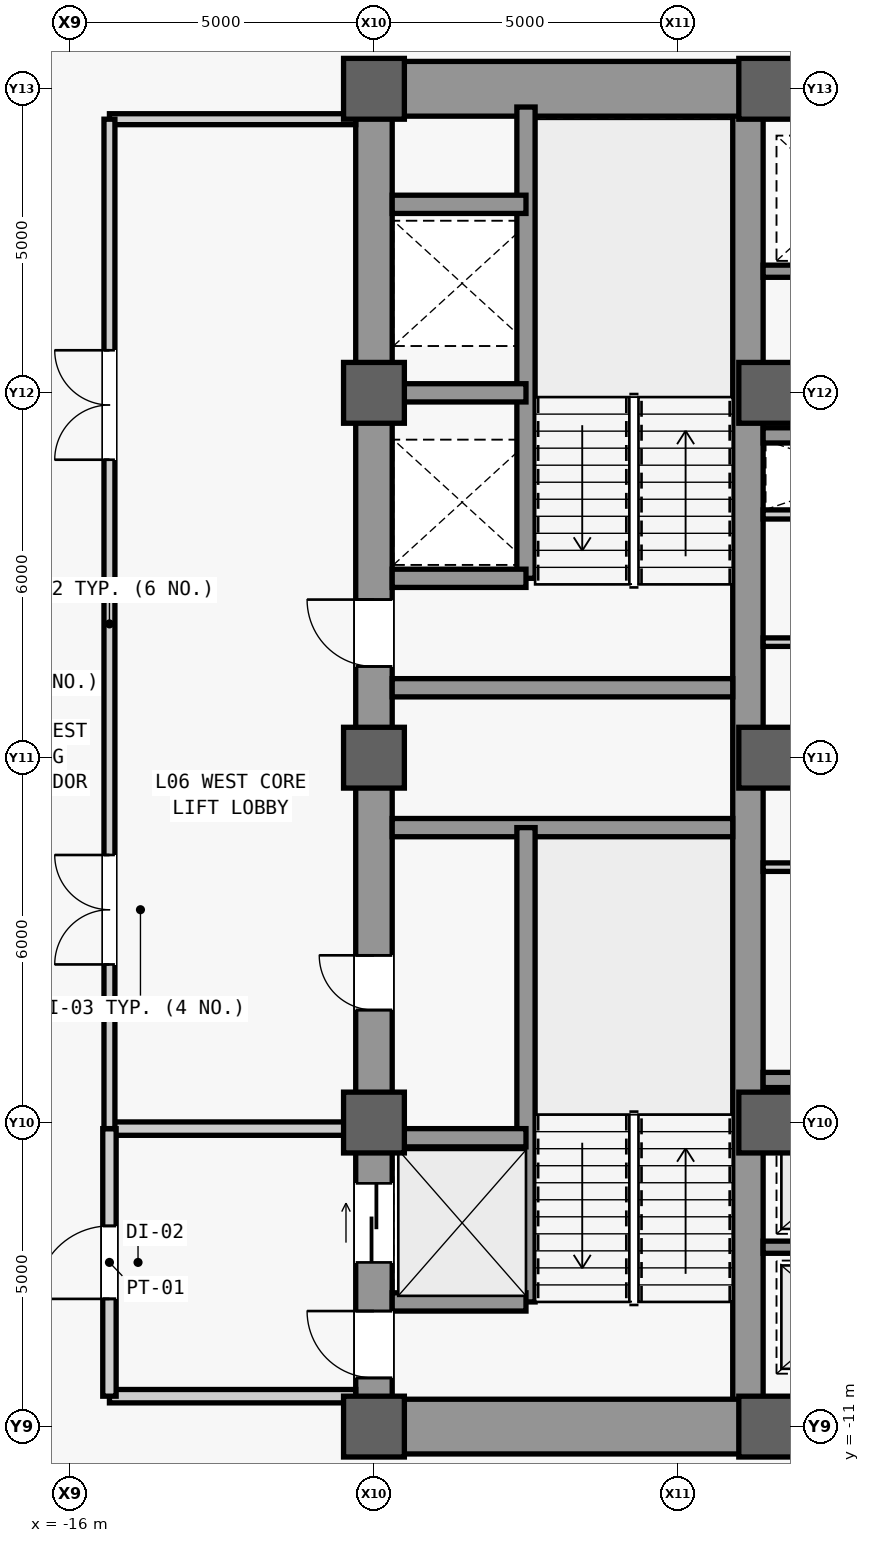
"""IFC4 building model, lengths in metres.
Left out: names, types, materials, properties, quantities, classifications, styles, units other than length and angle.
Written with IfcOpenShell. Run it as: python <this file> out.ifc"""

import sys

from ifc_helpers import new_model, si_unit, direction, frame, frame_2d, origin, origin_2d, place, context, subcontext, project, spatial, rectangle, extrude, source, transform, mapped, element, fill, save


model = new_model("IFC4")
c1 = context("Model", 3, precision=1e-05, world=origin(), true_north=direction((0.0, 1.0)))
c2 = subcontext(c1, "Body", "Model", "MODEL_VIEW")
j1 = project(units=[si_unit("LENGTHUNIT", "METRE"), si_unit("PLANEANGLEUNIT", "RADIAN")], contexts=[c1])
p1 = place(None, origin())
s1 = spatial("IfcSite", under=j1, at=p1, CompositionType="ELEMENT")
p2 = place(p1, origin())
s2 = spatial("IfcBuilding", under=s1, at=p2, CompositionType="ELEMENT")
p3 = place(p2, frame((0.0, 0.0, 32.6)))
s3 = spatial("IfcBuildingStorey", under=s2, at=p3, CompositionType="ELEMENT", Elevation=32.6)
m1 = source(origin(), c2, "Body", "SweptSolid", [
    extrude(rectangle(XDim=22.0, YDim=0.6, at=frame_2d((11.0, 0.0))), origin(), (0.0, 0.0, 1.0), 3.94),
])
p4 = place(p3, frame((-11.0, -11.0, 0.0), z_axis=(0.0, 0.0, 1.0), x_axis=(0.0, 1.0, 0.0)))
e1 = element("IfcWall", 1, at=p4, inside=s3, PredefinedType="SHEAR", context=c2, shape_type="MappedRepresentation", body=[
    mapped(m1, transform((0.0, 0.0, 0.0), scale=1.0)),
])
m2 = source(origin(), c2, "Body", "SweptSolid", [
    extrude(rectangle(XDim=1.1, YDim=2.2, at=frame_2d((0.55, 1.1))), frame((0.0, 0.31, 0.0), z_axis=(0.0, -1.0, 0.0), x_axis=(1.0, 0.0, 0.0)), (0.0, 0.0, 1.0), 0.62),
])
p5 = place(p4, frame((0.8, 0.0, 0.0)))
e2 = element("IfcOpeningElement", 2, at=p5, cuts=e1, PredefinedType="OPENING", context=c2, shape_type="MappedRepresentation", body=[
    mapped(m2, transform((0.0, 0.0, 0.0), scale=1.0)),
])
p6 = place(p4, frame((12.5, 0.0, 0.0)))
e3 = element("IfcOpeningElement", 3, at=p6, cuts=e1, PredefinedType="OPENING", context=c2, shape_type="MappedRepresentation", body=[
    mapped(m2, transform((0.0, 0.0, 0.0), scale=1.0)),
])
m3 = source(origin(), c2, "Body", "SweptSolid", [
    extrude(rectangle(XDim=0.9, YDim=2.15, at=frame_2d((0.45, 1.075))), frame((0.0, 0.31, 0.0), z_axis=(0.0, -1.0, 0.0), x_axis=(1.0, 0.0, 0.0)), (0.0, 0.0, 1.0), 0.62),
])
p7 = place(p4, frame((6.85, 0.0, 0.0)))
e4 = element("IfcOpeningElement", 4, at=p7, cuts=e1, PredefinedType="OPENING", context=c2, shape_type="MappedRepresentation", body=[
    mapped(m3, transform((0.0, 0.0, 0.0), scale=1.0)),
])
m4 = source(origin(), c2, "Body", "SweptSolid", [
    extrude(rectangle(XDim=1.3, YDim=2.3, at=frame_2d((0.65, 1.15))), frame((0.0, 0.31, 0.0), z_axis=(0.0, -1.0, 0.0), x_axis=(1.0, 0.0, 0.0)), (0.0, 0.0, 1.0), 0.62),
])
p8 = place(p4, frame((2.7, 0.0, 0.0)))
e5 = element("IfcOpeningElement", 5, at=p8, cuts=e1, PredefinedType="OPENING", context=c2, shape_type="MappedRepresentation", body=[
    mapped(m4, transform((0.0, 0.0, 0.0), scale=1.0)),
])
m5 = source(origin(), c2, "Body", "SweptSolid", [
    extrude(rectangle(XDim=21.4, YDim=0.5, at=frame_2d((10.7, 0.0))), origin(), (0.0, 0.0, 1.0), 3.94),
])
p9 = place(p3, frame((-4.85, -10.7, 0.0), z_axis=(0.0, 0.0, 1.0), x_axis=(0.0, 1.0, 0.0)))
e6 = element("IfcWall", 6, at=p9, inside=s3, PredefinedType="SHEAR", context=c2, shape_type="MappedRepresentation", body=[
    mapped(m5, transform((0.0, 0.0, 0.0), scale=1.0)),
])
m6 = source(origin(), c2, "Body", "SweptSolid", [
    extrude(rectangle(XDim=5.85, YDim=0.9, at=frame_2d((2.925, 0.0))), origin(), (0.0, 0.0, 1.0), 3.94),
])
for number, where, z_axis, x_axis in (
    (7, (-10.7, -11.0, 0.0), (0.0, 0.0, 1.0), (1.0, 0.0, 0.0)),
    (8, (-10.7, 11.0, 0.0), (0.0, 0.0, 1.0), (1.0, 0.0, 0.0)),
):
    element("IfcWall", number, at=place(p3, frame(where, z_axis=z_axis, x_axis=x_axis)), inside=s3, PredefinedType="SHEAR", context=c2, shape_type="MappedRepresentation", body=[
        mapped(m6, transform((0.0, 0.0, 0.0), scale=1.0)),
    ])
m7 = source(origin(), c2, "Body", "SweptSolid", [
    extrude(rectangle(XDim=5.6, YDim=0.3, at=frame_2d((2.8, 0.0))), origin(), (0.0, 0.0, 1.0), 3.94),
])
for number, where, z_axis, x_axis in (
    (9, (-10.7, -1.15, 0.0), (0.0, 0.0, 1.0), (1.0, 0.0, 0.0)),
    (10, (-10.7, 1.15, 0.0), (0.0, 0.0, 1.0), (1.0, 0.0, 0.0)),
):
    element("IfcWall", number, at=place(p3, frame(where, z_axis=z_axis, x_axis=x_axis)), inside=s3, PredefinedType="SHEAR", context=c2, shape_type="MappedRepresentation", body=[
        mapped(m7, transform((0.0, 0.0, 0.0), scale=1.0)),
    ])
m8 = source(origin(), c2, "Body", "SweptSolid", [
    extrude(rectangle(XDim=9.2, YDim=0.5, at=frame_2d((4.6, 0.0))), origin(), (0.0, 0.0, 1.0), 3.94),
])
p10 = place(p3, frame((-4.6, -11.0, 0.0), z_axis=(0.0, 0.0, 1.0), x_axis=(1.0, 0.0, 0.0)))
e11 = element("IfcWall", 11, at=p10, inside=s3, PredefinedType="SHEAR", context=c2, shape_type="MappedRepresentation", body=[
    mapped(m8, transform((0.0, 0.0, 0.0), scale=1.0)),
])
m9 = source(origin(), c2, "Body", "SweptSolid", [
    extrude(rectangle(XDim=1.8, YDim=2.25, at=frame_2d((0.9, 1.125))), frame((0.0, 0.26, 0.0), z_axis=(0.0, -1.0, 0.0), x_axis=(1.0, 0.0, 0.0)), (0.0, 0.0, 1.0), 0.52),
])
p11 = place(p10, frame((3.7, 0.0, 0.0)))
e12 = element("IfcOpeningElement", 12, at=p11, cuts=e11, PredefinedType="OPENING", context=c2, shape_type="MappedRepresentation", body=[
    mapped(m9, transform((0.0, 0.0, 0.0), scale=1.0)),
])
p12 = place(p3, frame((-4.6, 11.0, 0.0), z_axis=(0.0, 0.0, 1.0), x_axis=(1.0, 0.0, 0.0)))
e13 = element("IfcWall", 13, at=p12, inside=s3, PredefinedType="SHEAR", context=c2, shape_type="MappedRepresentation", body=[
    mapped(m8, transform((0.0, 0.0, 0.0), scale=1.0)),
])
p13 = place(p12, frame((3.7, 0.0, 0.0)))
e14 = element("IfcOpeningElement", 14, at=p13, cuts=e13, PredefinedType="OPENING", context=c2, shape_type="MappedRepresentation", body=[
    mapped(m9, transform((0.0, 0.0, 0.0), scale=1.0)),
])
m10 = source(origin(), c2, "Body", "SweptSolid", [
    extrude(rectangle(XDim=1.0, YDim=1.0, at=origin_2d()), origin(), (0.0, 0.0, 1.0), 4.2),
])
for number, where, z_axis, x_axis in (
    (15, (-11.0, -11.0, 0.0), (0.0, 0.0, 1.0), (1.0, 0.0, 0.0)),
    (16, (-11.0, -6.0, 0.0), (0.0, 0.0, 1.0), (1.0, 0.0, 0.0)),
    (17, (-11.0, 0.0, 0.0), (0.0, 0.0, 1.0), (1.0, 0.0, 0.0)),
    (18, (-11.0, 6.0, 0.0), (0.0, 0.0, 1.0), (1.0, 0.0, 0.0)),
    (19, (-11.0, 11.0, 0.0), (0.0, 0.0, 1.0), (1.0, 0.0, 0.0)),
    (20, (-4.5, -11.0, 0.0), (0.0, 0.0, 1.0), (1.0, 0.0, 0.0)),
    (21, (-4.5, -6.0, 0.0), (0.0, 0.0, 1.0), (1.0, 0.0, 0.0)),
    (22, (-4.5, 0.0, 0.0), (0.0, 0.0, 1.0), (1.0, 0.0, 0.0)),
    (23, (-4.5, 6.0, 0.0), (0.0, 0.0, 1.0), (1.0, 0.0, 0.0)),
    (24, (-4.5, 11.0, 0.0), (0.0, 0.0, 1.0), (1.0, 0.0, 0.0)),
):
    element("IfcColumn", number, at=place(p3, frame(where, z_axis=z_axis, x_axis=x_axis)), inside=s3, PredefinedType="COLUMN", context=c2, shape_type="MappedRepresentation", body=[
        mapped(m10, transform((0.0, 0.0, 0.0), scale=1.0)),
    ])
m11 = source(origin(), c2, "Body", "SweptSolid", [
    extrude(rectangle(XDim=7.8, YDim=0.3, at=frame_2d((3.9, 0.0))), origin(), (0.0, 0.0, 1.0), 3.94),
])
p14 = place(p3, frame((-8.5, -8.95, 0.0), z_axis=(0.0, 0.0, 1.0), x_axis=(0.0, 1.0, 0.0)))
e25 = element("IfcWall", 25, at=p14, inside=s3, PredefinedType="SHEAR", context=c2, shape_type="MappedRepresentation", body=[
    mapped(m11, transform((0.0, 0.0, 0.0), scale=1.0)),
])
m12 = source(origin(), c2, "Body", "SweptSolid", [
    extrude(rectangle(XDim=2.2, YDim=0.3, at=frame_2d((1.1, 0.0))), origin(), (0.0, 0.0, 1.0), 3.94),
])
for number, where, z_axis, x_axis in (
    (26, (-10.7, -8.95, 0.0), (0.0, 0.0, 1.0), (1.0, 0.0, 0.0)),
    (27, (-10.7, -6.25, 0.0), (0.0, 0.0, 1.0), (1.0, 0.0, 0.0)),
):
    element("IfcWall", number, at=place(p3, frame(where, z_axis=z_axis, x_axis=x_axis)), inside=s3, PredefinedType="SHEAR", context=c2, shape_type="MappedRepresentation", body=[
        mapped(m12, transform((0.0, 0.0, 0.0), scale=1.0)),
    ])
m13 = source(origin(), c2, "Body", "SweptSolid", [
    extrude(rectangle(XDim=7.75, YDim=0.3, at=frame_2d((3.875, 0.0))), origin(), (0.0, 0.0, 1.0), 3.94),
])
p15 = place(p3, frame((-8.5, 2.95, 0.0), z_axis=(0.0, 0.0, 1.0), x_axis=(0.0, 1.0, 0.0)))
e28 = element("IfcWall", 28, at=p15, inside=s3, PredefinedType="SHEAR", context=c2, shape_type="MappedRepresentation", body=[
    mapped(m13, transform((0.0, 0.0, 0.0), scale=1.0)),
])
for number, where, z_axis, x_axis in (
    (29, (-10.7, 2.95, 0.0), (0.0, 0.0, 1.0), (1.0, 0.0, 0.0)),
    (30, (-10.7, 6.0, 0.0), (0.0, 0.0, 1.0), (1.0, 0.0, 0.0)),
    (31, (-10.7, 9.1, 0.0), (0.0, 0.0, 1.0), (1.0, 0.0, 0.0)),
):
    element("IfcWall", number, at=place(p3, frame(where, z_axis=z_axis, x_axis=x_axis)), inside=s3, PredefinedType="SHEAR", context=c2, shape_type="MappedRepresentation", body=[
        mapped(m12, transform((0.0, 0.0, 0.0), scale=1.0)),
    ])
m14 = source(origin(), c2, "Body", "SweptSolid", [
    extrude(rectangle(XDim=4.05, YDim=0.22, at=frame_2d((2.025, 0.0))), origin(), (0.0, 0.0, 1.0), 3.94),
])
p16 = place(p3, frame((-15.35, -10.5, 0.0), z_axis=(0.0, 0.0, 1.0), x_axis=(1.0, 0.0, 0.0)))
e32 = element("IfcWall", 32, at=p16, inside=s3, PredefinedType="PARTITIONING", context=c2, shape_type="MappedRepresentation", body=[
    mapped(m14, transform((0.0, 0.0, 0.0), scale=1.0)),
])
m15 = source(origin(), c2, "Body", "SweptSolid", [
    extrude(rectangle(XDim=4.05, YDim=0.22, at=frame_2d((2.025, 0.0))), origin(), (0.0, 0.0, 1.0), 3.085),
])
p17 = place(p3, frame((-15.35, -6.1, 0.0), z_axis=(0.0, 0.0, 1.0), x_axis=(1.0, 0.0, 0.0)))
e33 = element("IfcWall", 33, at=p17, inside=s3, PredefinedType="PARTITIONING", context=c2, shape_type="MappedRepresentation", body=[
    mapped(m15, transform((0.0, 0.0, 0.0), scale=1.0)),
])
m16 = source(origin(), c2, "Body", "SweptSolid", [
    extrude(rectangle(XDim=4.4, YDim=0.22, at=frame_2d((2.2, 0.0))), origin(), (0.0, 0.0, 1.0), 3.94),
])
p18 = place(p3, frame((-15.35, -10.5, 0.0), z_axis=(0.0, 0.0, 1.0), x_axis=(0.0, 1.0, 0.0)))
e34 = element("IfcWall", 34, at=p18, inside=s3, PredefinedType="PARTITIONING", context=c2, shape_type="MappedRepresentation", body=[
    mapped(m16, transform((0.0, 0.0, 0.0), scale=1.0)),
])
m17 = source(origin(), c2, "Body", "SweptSolid", [
    extrude(rectangle(XDim=1.2, YDim=2.2, at=frame_2d((0.6, 1.1))), frame((0.0, 0.12, 0.0), z_axis=(0.0, -1.0, 0.0), x_axis=(1.0, 0.0, 0.0)), (0.0, 0.0, 1.0), 0.24),
])
p19 = place(p18, frame((1.6, 0.0, 0.0)))
e35 = element("IfcOpeningElement", 35, at=p19, cuts=e34, PredefinedType="OPENING", context=c2, shape_type="MappedRepresentation", body=[
    mapped(m17, transform((0.0, 0.0, 0.0), scale=1.0)),
])
m18 = source(origin(), c2, "Body", "SweptSolid", [
    extrude(rectangle(XDim=4.05, YDim=0.18, at=frame_2d((2.025, 0.0))), origin(), (0.0, 0.0, 1.0), 3.94),
])
p20 = place(p3, frame((-15.35, 10.5, 0.0), z_axis=(0.0, 0.0, 1.0), x_axis=(1.0, 0.0, 0.0)))
e36 = element("IfcWall", 36, at=p20, inside=s3, PredefinedType="PARTITIONING", context=c2, shape_type="MappedRepresentation", body=[
    mapped(m18, transform((0.0, 0.0, 0.0), scale=1.0)),
])
m19 = source(origin(), c2, "Body", "SweptSolid", [
    extrude(rectangle(XDim=16.6, YDim=0.18, at=frame_2d((8.3, 0.0))), origin(), (0.0, 0.0, 1.0), 3.94),
])
p21 = place(p3, frame((-15.35, -6.1, 0.0), z_axis=(0.0, 0.0, 1.0), x_axis=(0.0, 1.0, 0.0)))
e37 = element("IfcWall", 37, at=p21, inside=s3, PredefinedType="PARTITIONING", context=c2, shape_type="MappedRepresentation", body=[
    mapped(m19, transform((0.0, 0.0, 0.0), scale=1.0)),
])
m20 = source(origin(), c2, "Body", "SweptSolid", [
    extrude(rectangle(XDim=1.8, YDim=2.25, at=frame_2d((0.9, 1.125))), frame((0.0, 0.1, 0.0), z_axis=(0.0, -1.0, 0.0), x_axis=(1.0, 0.0, 0.0)), (0.0, 0.0, 1.0), 0.2),
])
p22 = place(p21, frame((2.7, 0.0, 0.0)))
e38 = element("IfcOpeningElement", 38, at=p22, cuts=e37, PredefinedType="OPENING", context=c2, shape_type="MappedRepresentation", body=[
    mapped(m20, transform((0.0, 0.0, 0.0), scale=1.0)),
])
p23 = place(p21, frame((11.0, 0.0, 0.0)))
e39 = element("IfcOpeningElement", 39, at=p23, cuts=e37, PredefinedType="OPENING", context=c2, shape_type="MappedRepresentation", body=[
    mapped(m20, transform((0.0, 0.0, 0.0), scale=1.0)),
])
m21 = source(origin(), c2, "Body", "SweptSolid", [
    extrude(rectangle(XDim=3.45, YDim=0.15, at=frame_2d((1.725, 0.0))), origin(), (0.0, 0.0, 1.0), 3.94),
])
p24 = place(p3, frame((-4.6, 4.0, 0.0), z_axis=(0.0, 0.0, 1.0), x_axis=(1.0, 0.0, 0.0)))
e40 = element("IfcWall", 40, at=p24, inside=s3, PredefinedType="PARTITIONING", context=c2, shape_type="MappedRepresentation", body=[
    mapped(m21, transform((0.0, 0.0, 0.0), scale=1.0)),
])
m22 = source(origin(), c2, "Body", "SweptSolid", [
    extrude(rectangle(XDim=2.45, YDim=0.2, at=frame_2d((1.225, 0.0))), origin(), (0.0, 0.0, 1.0), 3.94),
])
p25 = place(p3, frame((-4.6, -8.05, 0.0), z_axis=(0.0, 0.0, 1.0), x_axis=(1.0, 0.0, 0.0)))
e41 = element("IfcWall", 41, at=p25, inside=s3, PredefinedType="SHEAR", context=c2, shape_type="MappedRepresentation", body=[
    mapped(m22, transform((0.0, 0.0, 0.0), scale=1.0)),
])
m23 = source(origin(), c2, "Body", "SweptSolid", [
    extrude(rectangle(XDim=9.2, YDim=0.25, at=frame_2d((4.6, 0.0))), origin(), (0.0, 0.0, 1.0), 3.94),
])
p26 = place(p3, frame((-4.6, -5.3, 0.0), z_axis=(0.0, 0.0, 1.0), x_axis=(1.0, 0.0, 0.0)))
e42 = element("IfcWall", 42, at=p26, inside=s3, PredefinedType="SHEAR", context=c2, shape_type="MappedRepresentation", body=[
    mapped(m23, transform((0.0, 0.0, 0.0), scale=1.0)),
])
m24 = source(origin(), c2, "Body", "SweptSolid", [
    extrude(rectangle(XDim=1.05, YDim=2.2, at=frame_2d((0.525, 1.1))), frame((0.0, 0.135, 0.0), z_axis=(0.0, -1.0, 0.0), x_axis=(1.0, 0.0, 0.0)), (0.0, 0.0, 1.0), 0.27),
])
p27 = place(p26, frame((4.075, 0.0, 0.0)))
e43 = element("IfcOpeningElement", 43, at=p27, cuts=e42, PredefinedType="OPENING", context=c2, shape_type="MappedRepresentation", body=[
    mapped(m24, transform((0.0, 0.0, 0.0), scale=1.0)),
])
p28 = place(p3, frame((-4.6, 8.0, 0.0), z_axis=(0.0, 0.0, 1.0), x_axis=(1.0, 0.0, 0.0)))
e44 = element("IfcWall", 44, at=p28, inside=s3, PredefinedType="SHEAR", context=c2, shape_type="MappedRepresentation", body=[
    mapped(m22, transform((0.0, 0.0, 0.0), scale=1.0)),
])
p29 = place(p3, frame((-4.6, 5.3, 0.0), z_axis=(0.0, 0.0, 1.0), x_axis=(1.0, 0.0, 0.0)))
e45 = element("IfcWall", 45, at=p29, inside=s3, PredefinedType="SHEAR", context=c2, shape_type="MappedRepresentation", body=[
    mapped(m23, transform((0.0, 0.0, 0.0), scale=1.0)),
])
p30 = place(p29, frame((4.075, 0.0, 0.0)))
e46 = element("IfcOpeningElement", 46, at=p30, cuts=e45, PredefinedType="OPENING", context=c2, shape_type="MappedRepresentation", body=[
    mapped(m24, transform((0.0, 0.0, 0.0), scale=1.0)),
])
m25 = source(origin(), c2, "Body", "SweptSolid", [
    extrude(rectangle(XDim=3.45, YDim=0.14, at=frame_2d((1.725, 0.0))), origin(), (0.0, 0.0, 1.0), 3.94),
])
for number, where, z_axis, x_axis in (
    (47, (-4.6, -1.8, 0.0), (0.0, 0.0, 1.0), (1.0, 0.0, 0.0)),
    (48, (-4.6, 1.9, 0.0), (0.0, 0.0, 1.0), (1.0, 0.0, 0.0)),
):
    element("IfcWall", number, at=place(p3, frame(where, z_axis=z_axis, x_axis=x_axis)), inside=s3, PredefinedType="PARTITIONING", context=c2, shape_type="MappedRepresentation", body=[
        mapped(m25, transform((0.0, 0.0, 0.0), scale=1.0)),
    ])
m26 = source(origin(), c2, "Body", "SweptSolid", [
    extrude(rectangle(XDim=1.1, YDim=2.2, at=frame_2d((0.55, 1.1))), frame((0.0, 0.025, 0.0), z_axis=(0.0, -1.0, 0.0), x_axis=(1.0, 0.0, 0.0)), (0.0, 0.0, 1.0), 0.05),
])
p31 = place(p5, origin())
e49 = element("IfcDoor", 49, at=p31, inside=s3, OperationType="SINGLE_SWING_RIGHT", PredefinedType="DOOR", context=c2, shape_type="MappedRepresentation", body=[
    mapped(m26, transform((0.0, 0.0, 0.0), scale=1.0)),
])
fill(e2, e49)
p32 = place(p6, origin())
e50 = element("IfcDoor", 50, at=p32, inside=s3, OperationType="SINGLE_SWING_RIGHT", PredefinedType="DOOR", context=c2, shape_type="MappedRepresentation", body=[
    mapped(m26, transform((0.0, 0.0, 0.0), scale=1.0)),
])
fill(e3, e50)
m27 = source(origin(), c2, "Body", "SweptSolid", [
    extrude(rectangle(XDim=0.9, YDim=2.15, at=frame_2d((0.45, 1.075))), frame((0.0, 0.025, 0.0), z_axis=(0.0, -1.0, 0.0), x_axis=(1.0, 0.0, 0.0)), (0.0, 0.0, 1.0), 0.05),
])
p33 = place(p7, origin())
e51 = element("IfcDoor", 51, at=p33, inside=s3, OperationType="SINGLE_SWING_RIGHT", PredefinedType="DOOR", context=c2, shape_type="MappedRepresentation", body=[
    mapped(m27, transform((0.0, 0.0, 0.0), scale=1.0)),
])
fill(e4, e51)
m28 = source(origin(), c2, "Body", "SweptSolid", [
    extrude(rectangle(XDim=1.2, YDim=2.2, at=frame_2d((0.6, 1.1))), frame((0.0, 0.025, 0.0), z_axis=(0.0, -1.0, 0.0), x_axis=(1.0, 0.0, 0.0)), (0.0, 0.0, 1.0), 0.05),
])
p34 = place(p19, origin())
e52 = element("IfcDoor", 52, at=p34, inside=s3, OperationType="SINGLE_SWING_LEFT", PredefinedType="DOOR", context=c2, shape_type="MappedRepresentation", body=[
    mapped(m28, transform((0.0, 0.0, 0.0), scale=1.0)),
])
fill(e35, e52)
m29 = source(origin(), c2, "Body", "SweptSolid", [
    extrude(rectangle(XDim=1.8, YDim=2.25, at=frame_2d((0.9, 1.125))), frame((0.0, 0.025, 0.0), z_axis=(0.0, -1.0, 0.0), x_axis=(1.0, 0.0, 0.0)), (0.0, 0.0, 1.0), 0.05),
])
p35 = place(p22, origin())
e53 = element("IfcDoor", 53, at=p35, inside=s3, OperationType="SINGLE_SWING_LEFT", PredefinedType="DOOR", context=c2, shape_type="MappedRepresentation", body=[
    mapped(m29, transform((0.0, 0.0, 0.0), scale=1.0)),
])
fill(e38, e53)
p36 = place(p23, origin())
e54 = element("IfcDoor", 54, at=p36, inside=s3, OperationType="SINGLE_SWING_RIGHT", PredefinedType="DOOR", context=c2, shape_type="MappedRepresentation", body=[
    mapped(m29, transform((0.0, 0.0, 0.0), scale=1.0)),
])
fill(e39, e54)
m30 = source(origin(), c2, "Body", "SweptSolid", [
    extrude(rectangle(XDim=1.3, YDim=2.3, at=frame_2d((0.65, 1.15))), frame((0.0, 0.025, 0.0), z_axis=(0.0, -1.0, 0.0), x_axis=(1.0, 0.0, 0.0)), (0.0, 0.0, 1.0), 0.05),
])
p37 = place(p8, origin())
e55 = element("IfcDoor", 55, at=p37, inside=s3, OperationType="SLIDING_TO_LEFT", PredefinedType="DOOR", context=c2, shape_type="MappedRepresentation", body=[
    mapped(m30, transform((0.0, 0.0, 0.0), scale=1.0)),
])
fill(e5, e55)
save(model, sys.argv[1])
